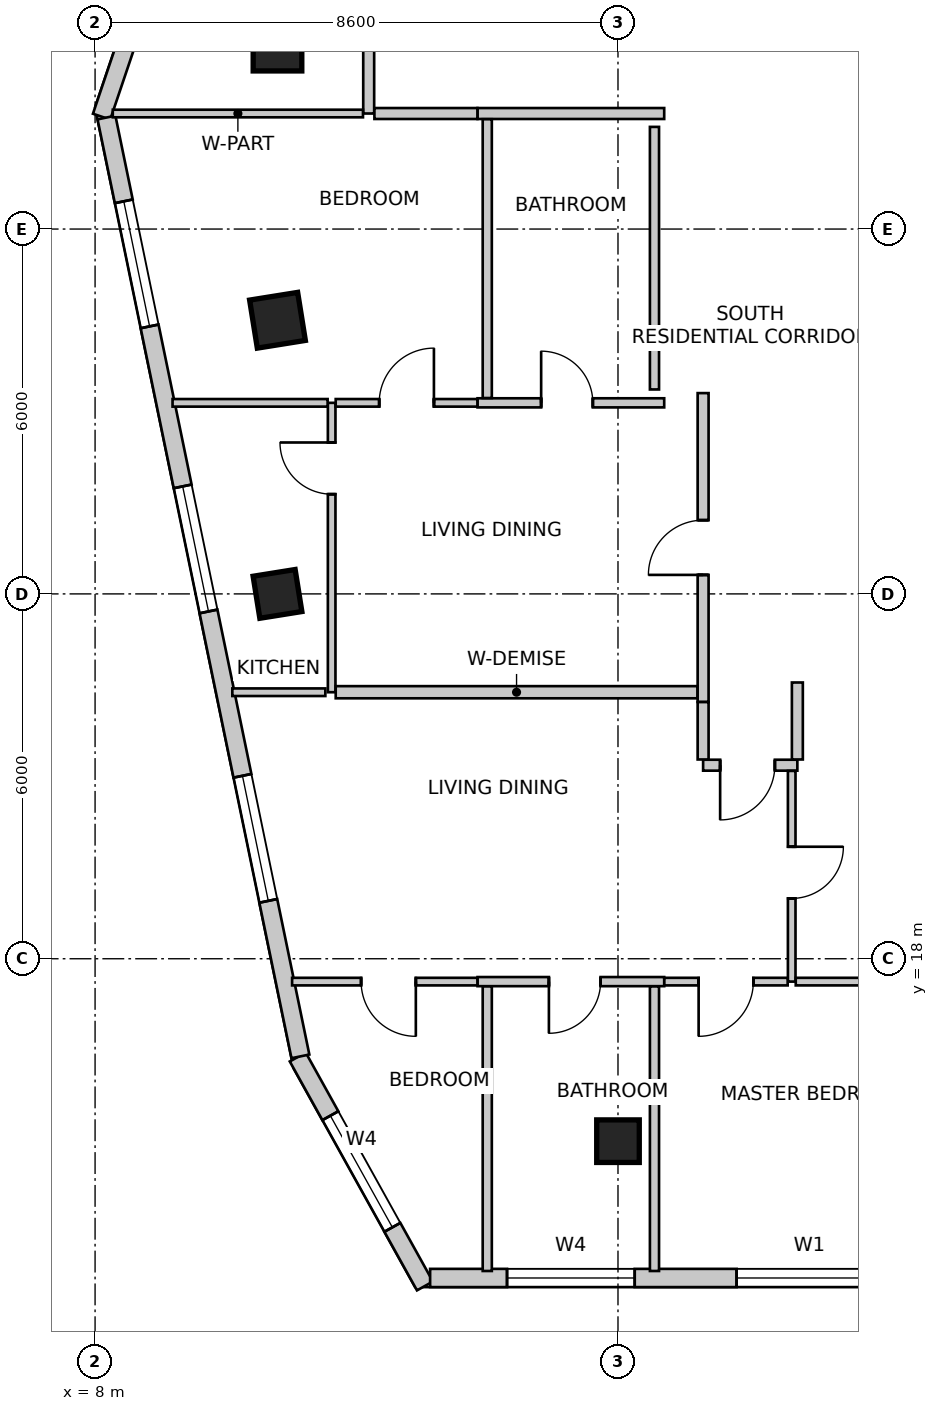
"""IFC4 building model, lengths in metres.
Left out: names, types, materials, properties, quantities, classifications, styles, units other than length and angle.
Written with IfcOpenShell. Run it as: python <this file> out.ifc"""

import sys

from ifc_helpers import new_model, si_unit, direction, frame, frame_2d, origin, origin_2d, place, context, subcontext, project, spatial, rectangle, extrude, source, transform, mapped, element, fill, save


model = new_model("IFC4")
c1 = context("Model", 3, precision=1e-05, world=origin(), true_north=direction((0.0, 1.0)))
c2 = subcontext(c1, "Body", "Model", "MODEL_VIEW")
j1 = project(units=[si_unit("LENGTHUNIT", "METRE"), si_unit("PLANEANGLEUNIT", "RADIAN")], contexts=[c1])
p1 = place(None, origin())
s1 = spatial("IfcSite", under=j1, at=p1, CompositionType="ELEMENT")
p2 = place(p1, origin())
s2 = spatial("IfcBuilding", under=s1, at=p2, CompositionType="ELEMENT")
p3 = place(p2, frame((0.0, 0.0, 221.9)))
s3 = spatial("IfcBuildingStorey", under=s2, at=p3, CompositionType="ELEMENT", Elevation=221.9)
m1 = source(origin(), c2, "Body", "SweptSolid", [
    extrude(rectangle(XDim=0.8, YDim=0.8, at=origin_2d()), origin(), (0.0, 0.0, 1.0), 3.5),
])
for number, where, z_axis, x_axis in (
    (1, (11.0, 33.0, 0.0), (0.0, 0.0, 1.0), (1.0, 0.0, 0.0)),
    (2, (11.0, 28.5, 0.0), (0.0, 0.0, 1.0), (0.158, -0.987, 0.0)),
):
    element("IfcColumn", number, at=place(p3, frame(where, z_axis=z_axis, x_axis=x_axis)), inside=s3, PredefinedType="COLUMN", context=c2, shape_type="MappedRepresentation", body=[
        mapped(m1, transform((0.0, 0.0, 0.0), scale=1.0)),
    ])
m2 = source(origin(), c2, "Body", "SweptSolid", [
    extrude(rectangle(XDim=0.7, YDim=0.7, at=origin_2d()), origin(), (0.0, 0.0, 1.0), 3.5),
])
for number, where, z_axis, x_axis in (
    (3, (11.0, 24.0, 0.0), (0.0, 0.0, 1.0), (0.158, -0.987, 0.0)),
    (4, (16.6, 15.0, 0.0), (0.0, 0.0, 1.0), (1.0, 0.0, 0.0)),
):
    element("IfcColumn", number, at=place(p3, frame(where, z_axis=z_axis, x_axis=x_axis)), inside=s3, PredefinedType="COLUMN", context=c2, shape_type="MappedRepresentation", body=[
        mapped(m2, transform((0.0, 0.0, 0.0), scale=1.0)),
    ])
p4 = place(p3, frame((11.333, 16.384, 0.0), z_axis=(0.0, 0.0, 1.0), x_axis=(0.485633305139, -0.874162623852, 0.0)))
e5 = element("IfcWall", 5, at=p4, inside=s3, PredefinedType="SOLIDWALL", context=c2, shape_type="SweptSolid", body=[
    extrude(rectangle(XDim=4.307, YDim=0.3, at=frame_2d((2.153, 0.0))), origin(), (0.0, 0.0, 1.0), 3.25),
])
m3 = source(origin(), c2, "Body", "SweptSolid", [
    extrude(rectangle(XDim=2.1, YDim=2.0, at=frame_2d((1.05, 1.0))), frame((0.0, 0.16, 0.0), z_axis=(0.0, -1.0, 0.0), x_axis=(1.0, 0.0, 0.0)), (0.0, 0.0, 1.0), 0.32),
])
p5 = place(p4, frame((1.104, 0.0, 0.85)))
e6 = element("IfcOpeningElement", 6, at=p5, cuts=e5, PredefinedType="OPENING", context=c2, shape_type="MappedRepresentation", body=[
    mapped(m3, transform((0.0, 0.0, 0.0), scale=1.0)),
])
p6 = place(p3, frame((13.51, 12.75, 0.0), z_axis=(0.0, 0.0, 1.0), x_axis=(1.0, 0.0, 0.0)))
e7 = element("IfcWall", 7, at=p6, inside=s3, PredefinedType="SOLIDWALL", context=c2, shape_type="SweptSolid", body=[
    extrude(rectangle(XDim=10.642, YDim=0.3, at=frame_2d((5.321, 0.0))), origin(), (0.0, 0.0, 1.0), 3.25),
])
p7 = place(p6, frame((1.265, 0.0, 0.85)))
e8 = element("IfcOpeningElement", 8, at=p7, cuts=e7, PredefinedType="OPENING", context=c2, shape_type="MappedRepresentation", body=[
    mapped(m3, transform((0.0, 0.0, 0.0), scale=1.0)),
])
m4 = source(origin(), c2, "Body", "SweptSolid", [
    extrude(rectangle(XDim=2.4, YDim=2.2, at=frame_2d((1.2, 1.1))), frame((0.0, 0.16, 0.0), z_axis=(0.0, -1.0, 0.0), x_axis=(1.0, 0.0, 0.0)), (0.0, 0.0, 1.0), 0.32),
])
p8 = place(p6, frame((5.04, 0.0, 0.85)))
e9 = element("IfcOpeningElement", 9, at=p8, cuts=e7, PredefinedType="OPENING", context=c2, shape_type="MappedRepresentation", body=[
    mapped(m4, transform((0.0, 0.0, 0.0), scale=1.0)),
])
p9 = place(p3, frame((13.269, 47.134, 0.0), z_axis=(0.0, 0.0, 1.0), x_axis=(-0.319920776449, -0.947444297464, 0.0)))
e10 = element("IfcWall", 10, at=p9, inside=s3, PredefinedType="SOLIDWALL", context=c2, shape_type="SweptSolid", body=[
    extrude(rectangle(XDim=16.133, YDim=0.3, at=frame_2d((8.067, 0.0))), origin(), (0.0, 0.0, 1.0), 3.25),
])
p10 = place(p9, frame((2.363, 0.0, 0.85)))
e11 = element("IfcOpeningElement", 11, at=p10, cuts=e10, PredefinedType="OPENING", context=c2, shape_type="MappedRepresentation", body=[
    mapped(m4, transform((0.0, 0.0, 0.0), scale=1.0)),
])
p11 = place(p9, frame((7.41, 0.0, 0.85)))
e12 = element("IfcOpeningElement", 12, at=p11, cuts=e10, PredefinedType="OPENING", context=c2, shape_type="MappedRepresentation", body=[
    mapped(m3, transform((0.0, 0.0, 0.0), scale=1.0)),
])
p12 = place(p9, frame((12.157, 0.0, 0.85)))
e13 = element("IfcOpeningElement", 13, at=p12, cuts=e10, PredefinedType="OPENING", context=c2, shape_type="MappedRepresentation", body=[
    mapped(m4, transform((0.0, 0.0, 0.0), scale=1.0)),
])
p13 = place(p3, frame((8.188, 31.834, 0.0), z_axis=(0.0, 0.0, 1.0), x_axis=(0.202303475707, -0.979322880217, 0.0)))
e14 = element("IfcWall", 14, at=p13, inside=s3, PredefinedType="SOLIDWALL", context=c2, shape_type="SweptSolid", body=[
    extrude(rectangle(XDim=15.766, YDim=0.3, at=frame_2d((7.883, 0.0))), origin(), (0.0, 0.0, 1.0), 3.25),
])
p14 = place(p13, frame((1.407, 0.0, 0.85)))
e15 = element("IfcOpeningElement", 15, at=p14, cuts=e14, PredefinedType="OPENING", context=c2, shape_type="MappedRepresentation", body=[
    mapped(m3, transform((0.0, 0.0, 0.0), scale=1.0)),
])
p15 = place(p13, frame((6.194, 0.0, 0.85)))
e16 = element("IfcOpeningElement", 16, at=p15, cuts=e14, PredefinedType="OPENING", context=c2, shape_type="MappedRepresentation", body=[
    mapped(m3, transform((0.0, 0.0, 0.0), scale=1.0)),
])
p16 = place(p13, frame((11.054, 0.0, 0.85)))
e17 = element("IfcOpeningElement", 17, at=p16, cuts=e14, PredefinedType="OPENING", context=c2, shape_type="MappedRepresentation", body=[
    mapped(m3, transform((0.0, 0.0, 0.0), scale=1.0)),
])
p17 = place(p3, frame((12.5, 31.9, 0.0), z_axis=(0.0, 0.0, 1.0), x_axis=(0.0, 1.0, 0.0)))
e18 = element("IfcWall", 18, at=p17, inside=s3, PredefinedType="PARTITIONING", context=c2, shape_type="SweptSolid", body=[
    extrude(rectangle(XDim=1.556, YDim=0.18, at=frame_2d((0.778, 0.0))), origin(), (0.0, 0.0, 1.0), 2.934),
])
p18 = place(p3, frame((17.36, 31.9, 0.0), z_axis=(0.0, 0.0, 1.0), x_axis=(-1.0, 0.0, 0.0)))
e19 = element("IfcWall", 19, at=p18, inside=s3, PredefinedType="PARTITIONING", context=c2, shape_type="SweptSolid", body=[
    extrude(rectangle(XDim=3.07, YDim=0.18, at=frame_2d((1.535, 0.0))), origin(), (0.0, 0.0, 1.0), 2.934),
])
p19 = place(p3, frame((14.288, 31.9, 0.0), z_axis=(0.0, 0.0, 1.0), x_axis=(-1.0, 0.0, 0.0)))
e20 = element("IfcWall", 20, at=p19, inside=s3, PredefinedType="PARTITIONING", context=c2, shape_type="SweptSolid", body=[
    extrude(rectangle(XDim=1.694, YDim=0.18, at=frame_2d((0.847, 0.0))), origin(), (0.0, 0.0, 1.0), 2.934),
])
p20 = place(p3, frame((12.406, 31.9, 0.0), z_axis=(0.0, 0.0, 1.0), x_axis=(-1.0, 0.0, 0.0)))
e21 = element("IfcWall", 21, at=p20, inside=s3, PredefinedType="PARTITIONING", context=c2, shape_type="SweptSolid", body=[
    extrude(rectangle(XDim=4.115, YDim=0.125, at=frame_2d((2.057, 0.0))), origin(), (0.0, 0.0, 1.0), 2.542),
])
p21 = place(p3, frame((18.0, 22.223, 0.0), z_axis=(0.0, 0.0, 1.0), x_axis=(0.0, 1.0, 0.0)))
e22 = element("IfcWall", 22, at=p21, inside=s3, PredefinedType="PARTITIONING", context=c2, shape_type="SweptSolid", body=[
    extrude(rectangle(XDim=5.079, YDim=0.18, at=frame_2d((2.54, 0.0))), origin(), (0.0, 0.0, 1.0), 2.766),
])
m5 = source(origin(), c2, "Body", "SweptSolid", [
    extrude(rectangle(XDim=0.9, YDim=2.15, at=frame_2d((0.45, 1.075))), frame((0.0, 0.1, 0.0), z_axis=(0.0, -1.0, 0.0), x_axis=(1.0, 0.0, 0.0)), (0.0, 0.0, 1.0), 0.2),
])
p22 = place(p21, frame((2.09, 0.0, 0.0)))
e23 = element("IfcOpeningElement", 23, at=p22, cuts=e22, PredefinedType="OPENING", context=c2, shape_type="MappedRepresentation", body=[
    mapped(m5, transform((0.0, 0.0, 0.0), scale=1.0)),
])
p23 = place(p3, frame((19.55, 21.183, 0.0), z_axis=(0.0, 0.0, 1.0), x_axis=(-1.0, 0.0, 0.0)))
e24 = element("IfcWall", 24, at=p23, inside=s3, PredefinedType="PARTITIONING", context=c2, shape_type="SweptSolid", body=[
    extrude(rectangle(XDim=1.55, YDim=0.18, at=frame_2d((0.775, 0.0))), origin(), (0.0, 0.0, 1.0), 2.822),
])
p24 = place(p23, frame((0.37, 0.0, 0.0)))
e25 = element("IfcOpeningElement", 25, at=p24, cuts=e24, PredefinedType="OPENING", context=c2, shape_type="MappedRepresentation", body=[
    mapped(m5, transform((0.0, 0.0, 0.0), scale=1.0)),
])
p25 = place(p3, frame((18.0, 21.277, 0.0), z_axis=(0.0, 0.0, 1.0), x_axis=(0.0, 1.0, 0.0)))
e26 = element("IfcWall", 26, at=p25, inside=s3, PredefinedType="PARTITIONING", context=c2, shape_type="SweptSolid", body=[
    extrude(rectangle(XDim=0.944, YDim=0.18, at=frame_2d((0.472, 0.0))), origin(), (0.0, 0.0, 1.0), 2.822),
])
p26 = place(p3, frame((19.55, 22.543, 0.0), z_axis=(0.0, 0.0, 1.0), x_axis=(0.0, -1.0, 0.0)))
e27 = element("IfcWall", 27, at=p26, inside=s3, PredefinedType="PARTITIONING", context=c2, shape_type="SweptSolid", body=[
    extrude(rectangle(XDim=1.266, YDim=0.18, at=frame_2d((0.633, 0.0))), origin(), (0.0, 0.0, 1.0), 3.25),
])
p27 = place(p3, frame((11.891, 22.383, 0.0), z_axis=(0.0, 0.0, 1.0), x_axis=(0.0, 1.0, 0.0)))
e28 = element("IfcWall", 28, at=p27, inside=s3, PredefinedType="PARTITIONING", context=c2, shape_type="SweptSolid", body=[
    extrude(rectangle(XDim=4.759, YDim=0.125, at=frame_2d((2.379, 0.0))), origin(), (0.0, 0.0, 1.0), 2.766),
])
m6 = source(origin(), c2, "Body", "SweptSolid", [
    extrude(rectangle(XDim=0.85, YDim=2.15, at=frame_2d((0.425, 1.075))), frame((0.0, 0.073, 0.0), z_axis=(0.0, -1.0, 0.0), x_axis=(1.0, 0.0, 0.0)), (0.0, 0.0, 1.0), 0.145),
])
p28 = place(p27, frame((3.257, 0.0, 0.0)))
e29 = element("IfcOpeningElement", 29, at=p28, cuts=e28, PredefinedType="OPENING", context=c2, shape_type="MappedRepresentation", body=[
    mapped(m6, transform((0.0, 0.0, 0.0), scale=1.0)),
])
p29 = place(p3, frame((14.29, 27.142, 0.0), z_axis=(0.0, 0.0, 1.0), x_axis=(1.0, 0.0, 0.0)))
e30 = element("IfcWall", 30, at=p29, inside=s3, PredefinedType="PARTITIONING", context=c2, shape_type="SweptSolid", body=[
    extrude(rectangle(XDim=3.07, YDim=0.15, at=frame_2d((1.535, 0.0))), origin(), (0.0, 0.0, 1.0), 2.934),
])
m7 = source(origin(), c2, "Body", "SweptSolid", [
    extrude(rectangle(XDim=0.85, YDim=2.15, at=frame_2d((0.425, 1.075))), frame((0.0, 0.085, 0.0), z_axis=(0.0, -1.0, 0.0), x_axis=(1.0, 0.0, 0.0)), (0.0, 0.0, 1.0), 0.17),
])
p30 = place(p29, frame((1.046, 0.0, 0.0)))
e31 = element("IfcOpeningElement", 31, at=p30, cuts=e30, PredefinedType="OPENING", context=c2, shape_type="MappedRepresentation", body=[
    mapped(m7, transform((0.0, 0.0, 0.0), scale=1.0)),
])
p31 = place(p3, frame((11.958, 27.142, 0.0), z_axis=(0.0, 0.0, 1.0), x_axis=(1.0, 0.0, 0.0)))
e32 = element("IfcWall", 32, at=p31, inside=s3, PredefinedType="PARTITIONING", context=c2, shape_type="SweptSolid", body=[
    extrude(rectangle(XDim=2.331, YDim=0.125, at=frame_2d((1.165, 0.0))), origin(), (0.0, 0.0, 1.0), 3.25),
])
m8 = source(origin(), c2, "Body", "SweptSolid", [
    extrude(rectangle(XDim=0.9, YDim=2.15, at=frame_2d((0.45, 1.075))), frame((0.0, 0.073, 0.0), z_axis=(0.0, -1.0, 0.0), x_axis=(1.0, 0.0, 0.0)), (0.0, 0.0, 1.0), 0.145),
])
p32 = place(p31, frame((0.715, 0.0, 0.0)))
e33 = element("IfcOpeningElement", 33, at=p32, cuts=e32, PredefinedType="OPENING", context=c2, shape_type="MappedRepresentation", body=[
    mapped(m8, transform((0.0, 0.0, 0.0), scale=1.0)),
])
p33 = place(p3, frame((17.906, 22.383, 0.0), z_axis=(0.0, 0.0, 1.0), x_axis=(-1.0, 0.0, 0.0)))
e34 = element("IfcWall", 34, at=p33, inside=s3, PredefinedType="PARTITIONING", context=c2, shape_type="SweptSolid", body=[
    extrude(rectangle(XDim=5.948, YDim=0.2, at=frame_2d((2.974, 0.0))), origin(), (0.0, 0.0, 1.0), 2.822),
])
p34 = place(p3, frame((9.274, 27.142, 0.0), z_axis=(0.0, 0.0, 1.0), x_axis=(1.0, 0.0, 0.0)))
e35 = element("IfcWall", 35, at=p34, inside=s3, PredefinedType="PARTITIONING", context=c2, shape_type="SweptSolid", body=[
    extrude(rectangle(XDim=2.55, YDim=0.125, at=frame_2d((1.275, 0.0))), origin(), (0.0, 0.0, 1.0), 2.542),
])
p35 = place(p3, frame((11.787, 22.383, 0.0), z_axis=(0.0, 0.0, 1.0), x_axis=(-1.0, 0.0, 0.0)))
e36 = element("IfcWall", 36, at=p35, inside=s3, PredefinedType="PARTITIONING", context=c2, shape_type="SweptSolid", body=[
    extrude(rectangle(XDim=1.53, YDim=0.125, at=frame_2d((0.765, 0.0))), origin(), (0.0, 0.0, 1.0), 3.25),
])
p36 = place(p3, frame((14.45, 27.221, 0.0), z_axis=(0.0, 0.0, 1.0), x_axis=(0.0, 1.0, 0.0)))
e37 = element("IfcWall", 37, at=p36, inside=s3, PredefinedType="PARTITIONING", context=c2, shape_type="SweptSolid", body=[
    extrude(rectangle(XDim=4.585, YDim=0.15, at=frame_2d((2.292, 0.0))), origin(), (0.0, 0.0, 1.0), 2.766),
])
p37 = place(p3, frame((19.457, 21.089, 0.0), z_axis=(0.0, 0.0, 1.0), x_axis=(0.0, -1.0, 0.0)))
e38 = element("IfcWall", 38, at=p37, inside=s3, PredefinedType="PARTITIONING", context=c2, shape_type="SweptSolid", body=[
    extrude(rectangle(XDim=3.465, YDim=0.125, at=frame_2d((1.732, 0.0))), origin(), (0.0, 0.0, 1.0), 2.822),
])
p38 = place(p37, frame((1.247, 0.0, 0.0)))
e39 = element("IfcOpeningElement", 39, at=p38, cuts=e38, PredefinedType="OPENING", context=c2, shape_type="MappedRepresentation", body=[
    mapped(m6, transform((0.0, 0.0, 0.0), scale=1.0)),
])
p39 = place(p3, frame((17.36, 17.624, 0.0), z_axis=(0.0, 0.0, 1.0), x_axis=(-1.0, 0.0, 0.0)))
e40 = element("IfcWall", 40, at=p39, inside=s3, PredefinedType="PARTITIONING", context=c2, shape_type="SweptSolid", body=[
    extrude(rectangle(XDim=3.07, YDim=0.15, at=frame_2d((1.535, 0.0))), origin(), (0.0, 0.0, 1.0), 3.25),
])
p40 = place(p39, frame((1.046, 0.0, 0.0)))
e41 = element("IfcOpeningElement", 41, at=p40, cuts=e40, PredefinedType="OPENING", context=c2, shape_type="MappedRepresentation", body=[
    mapped(m7, transform((0.0, 0.0, 0.0), scale=1.0)),
])
p41 = place(p3, frame((14.288, 17.624, 0.0), z_axis=(0.0, 0.0, 1.0), x_axis=(-1.0, 0.0, 0.0)))
e42 = element("IfcWall", 42, at=p41, inside=s3, PredefinedType="PARTITIONING", context=c2, shape_type="SweptSolid", body=[
    extrude(rectangle(XDim=3.048, YDim=0.125, at=frame_2d((1.524, 0.0))), origin(), (0.0, 0.0, 1.0), 3.25),
])
p42 = place(p41, frame((1.013, 0.0, 0.0)))
e43 = element("IfcOpeningElement", 43, at=p42, cuts=e42, PredefinedType="OPENING", context=c2, shape_type="MappedRepresentation", body=[
    mapped(m8, transform((0.0, 0.0, 0.0), scale=1.0)),
])
p43 = place(p3, frame((19.39, 17.624, 0.0), z_axis=(0.0, 0.0, 1.0), x_axis=(-1.0, 0.0, 0.0)))
e44 = element("IfcWall", 44, at=p43, inside=s3, PredefinedType="PARTITIONING", context=c2, shape_type="SweptSolid", body=[
    extrude(rectangle(XDim=2.028, YDim=0.125, at=frame_2d((1.014, 0.0))), origin(), (0.0, 0.0, 1.0), 3.25),
])
p44 = place(p43, frame((0.564, 0.0, 0.0)))
e45 = element("IfcOpeningElement", 45, at=p44, cuts=e44, PredefinedType="OPENING", context=c2, shape_type="MappedRepresentation", body=[
    mapped(m8, transform((0.0, 0.0, 0.0), scale=1.0)),
])
p45 = place(p3, frame((22.46, 17.624, 0.0), z_axis=(0.0, 0.0, 1.0), x_axis=(-1.0, 0.0, 0.0)))
e46 = element("IfcWall", 46, at=p45, inside=s3, PredefinedType="PARTITIONING", context=c2, shape_type="SweptSolid", body=[
    extrude(rectangle(XDim=2.937, YDim=0.125, at=frame_2d((1.468, 0.0))), origin(), (0.0, 0.0, 1.0), 2.822),
])
p46 = place(p3, frame((14.45, 12.865, 0.0), z_axis=(0.0, 0.0, 1.0), x_axis=(0.0, 1.0, 0.0)))
e47 = element("IfcWall", 47, at=p46, inside=s3, PredefinedType="PARTITIONING", context=c2, shape_type="SweptSolid", body=[
    extrude(rectangle(XDim=4.68, YDim=0.15, at=frame_2d((2.34, 0.0))), origin(), (0.0, 0.0, 1.0), 3.25),
])
p47 = place(p3, frame((17.2, 17.545, 0.0), z_axis=(0.0, 0.0, 1.0), x_axis=(0.0, -1.0, 0.0)))
e48 = element("IfcWall", 48, at=p47, inside=s3, PredefinedType="PARTITIONING", context=c2, shape_type="SweptSolid", body=[
    extrude(rectangle(XDim=4.68, YDim=0.15, at=frame_2d((2.34, 0.0))), origin(), (0.0, 0.0, 1.0), 2.542),
])
p48 = place(p3, frame((17.2, 31.68, 0.0), z_axis=(0.0, 0.0, 1.0), x_axis=(0.0, -1.0, 0.0)))
e49 = element("IfcWall", 49, at=p48, inside=s3, PredefinedType="PARTITIONING", context=c2, shape_type="SweptSolid", body=[
    extrude(rectangle(XDim=4.318, YDim=0.15, at=frame_2d((2.159, 0.0))), origin(), (0.0, 0.0, 1.0), 2.766),
])
m9 = source(origin(), c2, "Body", "SweptSolid", [
    extrude(rectangle(XDim=2.1, YDim=2.0, at=frame_2d((1.05, 1.0))), frame((0.0, -0.015, 0.0), z_axis=(0.0, -1.0, 0.0), x_axis=(1.0, 0.0, 0.0)), (0.0, 0.0, 1.0), 0.06),
])
p49 = place(p5, origin())
e50 = element("IfcWindow", 50, at=p49, inside=s3, PartitioningType="SINGLE_PANEL", PredefinedType="WINDOW", context=c2, shape_type="MappedRepresentation", body=[
    mapped(m9, transform((0.0, 0.0, 0.0), scale=1.0)),
])
fill(e6, e50)
p50 = place(p7, origin())
e51 = element("IfcWindow", 51, at=p50, inside=s3, PartitioningType="SINGLE_PANEL", PredefinedType="WINDOW", context=c2, shape_type="MappedRepresentation", body=[
    mapped(m9, transform((0.0, 0.0, 0.0), scale=1.0)),
])
fill(e8, e51)
m10 = source(origin(), c2, "Body", "SweptSolid", [
    extrude(rectangle(XDim=2.4, YDim=2.2, at=frame_2d((1.2, 1.1))), frame((0.0, -0.015, 0.0), z_axis=(0.0, -1.0, 0.0), x_axis=(1.0, 0.0, 0.0)), (0.0, 0.0, 1.0), 0.06),
])
p51 = place(p8, origin())
e52 = element("IfcWindow", 52, at=p51, inside=s3, PartitioningType="SINGLE_PANEL", PredefinedType="WINDOW", context=c2, shape_type="MappedRepresentation", body=[
    mapped(m10, transform((0.0, 0.0, 0.0), scale=1.0)),
])
fill(e9, e52)
p52 = place(p14, origin())
e53 = element("IfcWindow", 53, at=p52, inside=s3, PartitioningType="SINGLE_PANEL", PredefinedType="WINDOW", context=c2, shape_type="MappedRepresentation", body=[
    mapped(m9, transform((0.0, 0.0, 0.0), scale=1.0)),
])
fill(e15, e53)
p53 = place(p15, origin())
e54 = element("IfcWindow", 54, at=p53, inside=s3, PartitioningType="SINGLE_PANEL", PredefinedType="WINDOW", context=c2, shape_type="MappedRepresentation", body=[
    mapped(m9, transform((0.0, 0.0, 0.0), scale=1.0)),
])
fill(e16, e54)
p54 = place(p16, origin())
e55 = element("IfcWindow", 55, at=p54, inside=s3, PartitioningType="SINGLE_PANEL", PredefinedType="WINDOW", context=c2, shape_type="MappedRepresentation", body=[
    mapped(m9, transform((0.0, 0.0, 0.0), scale=1.0)),
])
fill(e17, e55)
m11 = source(origin(), c2, "Body", "SweptSolid", [
    extrude(rectangle(XDim=0.9, YDim=2.15, at=frame_2d((0.45, 1.075))), frame((0.0, 0.025, 0.0), z_axis=(0.0, -1.0, 0.0), x_axis=(1.0, 0.0, 0.0)), (0.0, 0.0, 1.0), 0.05),
])
p55 = place(p22, origin())
e56 = element("IfcDoor", 56, at=p55, inside=s3, OperationType="SINGLE_SWING_LEFT", PredefinedType="DOOR", context=c2, shape_type="MappedRepresentation", body=[
    mapped(m11, transform((0.0, 0.0, 0.0), scale=1.0)),
])
fill(e23, e56)
m12 = source(origin(), c2, "Body", "SweptSolid", [
    extrude(rectangle(XDim=0.85, YDim=2.15, at=frame_2d((0.425, 1.075))), frame((0.0, 0.025, 0.0), z_axis=(0.0, -1.0, 0.0), x_axis=(1.0, 0.0, 0.0)), (0.0, 0.0, 1.0), 0.05),
])
p56 = place(p28, origin())
e57 = element("IfcDoor", 57, at=p56, inside=s3, OperationType="SINGLE_SWING_RIGHT", PredefinedType="DOOR", context=c2, shape_type="MappedRepresentation", body=[
    mapped(m12, transform((0.0, 0.0, 0.0), scale=1.0)),
])
fill(e29, e57)
p57 = place(p30, origin())
e58 = element("IfcDoor", 58, at=p57, inside=s3, OperationType="SINGLE_SWING_LEFT", PredefinedType="DOOR", context=c2, shape_type="MappedRepresentation", body=[
    mapped(m12, transform((0.0, 0.0, 0.0), scale=1.0)),
])
fill(e31, e58)
m13 = source(origin(), c2, "Body", "SweptSolid", [
    extrude(rectangle(XDim=0.9, YDim=2.15, at=frame_2d((0.45, 1.075))), frame((0.0, 0.025, 0.0), z_axis=(0.0, -1.0, 0.0), x_axis=(1.0, 0.0, 0.0)), (0.0, 0.0, 1.0), 0.05),
])
p58 = place(p32, origin())
e59 = element("IfcDoor", 59, at=p58, inside=s3, OperationType="SINGLE_SWING_RIGHT", PredefinedType="DOOR", context=c2, shape_type="MappedRepresentation", body=[
    mapped(m13, transform((0.0, 0.0, 0.0), scale=1.0)),
])
fill(e33, e59)
p59 = place(p24, origin())
e60 = element("IfcDoor", 60, at=p59, inside=s3, OperationType="SINGLE_SWING_RIGHT", PredefinedType="DOOR", context=c2, shape_type="MappedRepresentation", body=[
    mapped(m11, transform((0.0, 0.0, 0.0), scale=1.0)),
])
fill(e25, e60)
p60 = place(p38, origin())
e61 = element("IfcDoor", 61, at=p60, inside=s3, OperationType="SINGLE_SWING_LEFT", PredefinedType="DOOR", context=c2, shape_type="MappedRepresentation", body=[
    mapped(m12, transform((0.0, 0.0, 0.0), scale=1.0)),
])
fill(e39, e61)
p61 = place(p40, origin())
e62 = element("IfcDoor", 62, at=p61, inside=s3, OperationType="SINGLE_SWING_RIGHT", PredefinedType="DOOR", context=c2, shape_type="MappedRepresentation", body=[
    mapped(m12, transform((0.0, 0.0, 0.0), scale=1.0)),
])
fill(e41, e62)
p62 = place(p42, origin())
e63 = element("IfcDoor", 63, at=p62, inside=s3, OperationType="SINGLE_SWING_LEFT", PredefinedType="DOOR", context=c2, shape_type="MappedRepresentation", body=[
    mapped(m13, transform((0.0, 0.0, 0.0), scale=1.0)),
])
fill(e43, e63)
p63 = place(p44, origin())
e64 = element("IfcDoor", 64, at=p63, inside=s3, OperationType="SINGLE_SWING_RIGHT", PredefinedType="DOOR", context=c2, shape_type="MappedRepresentation", body=[
    mapped(m13, transform((0.0, 0.0, 0.0), scale=1.0)),
])
fill(e45, e64)
save(model, sys.argv[1])
